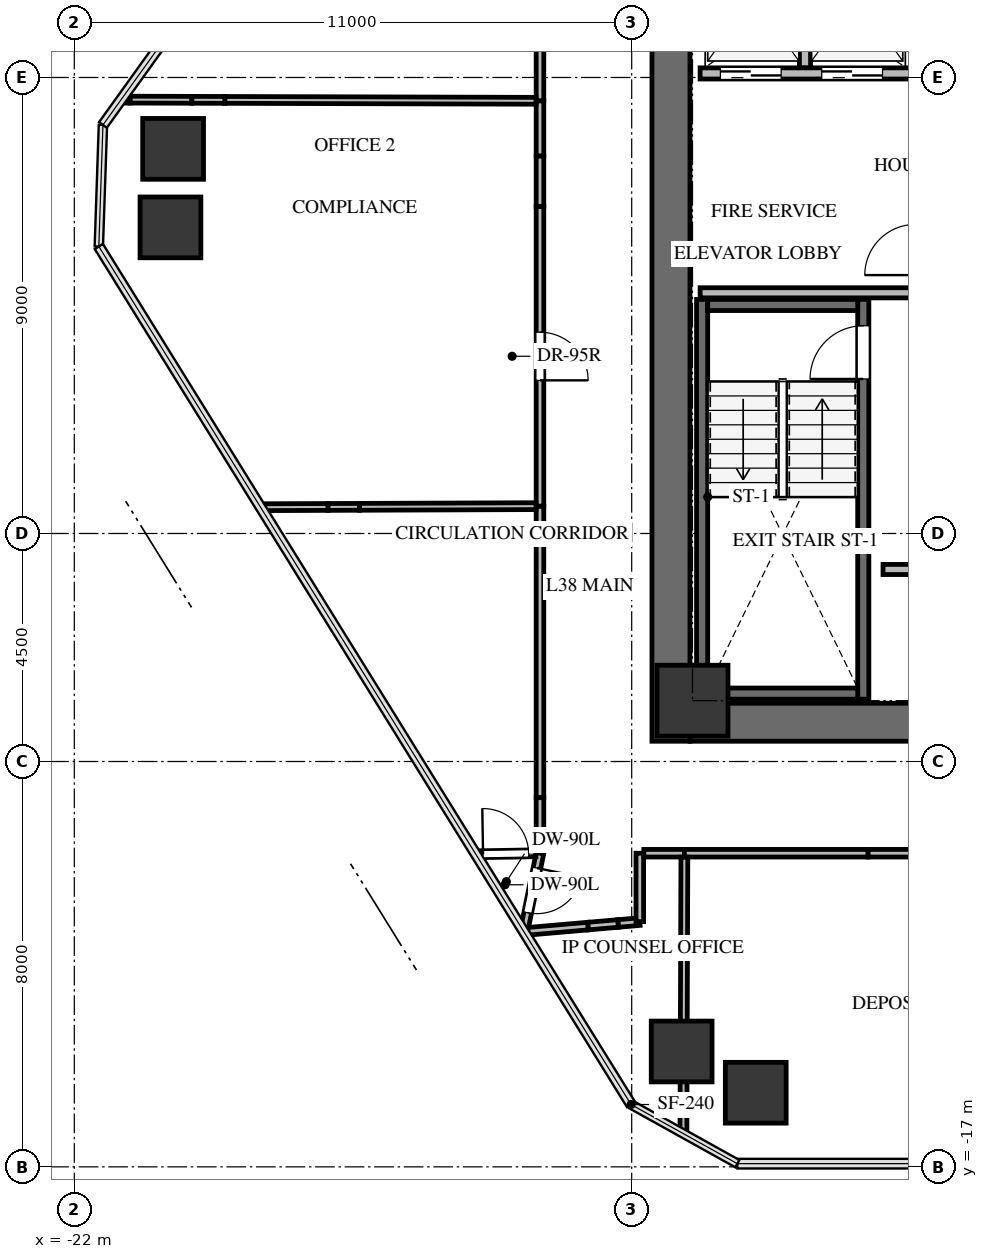
"""IFC4 building model, lengths in metres.
Left out: names, types, materials, properties, quantities, classifications, styles, units other than length and angle.
Written with IfcOpenShell. Run it as: python <this file> out.ifc"""

import sys

from ifc_helpers import new_model, si_unit, direction, frame, frame_2d, origin, origin_2d, place, context, subcontext, project, spatial, rectangle, extrude, source, transform, mapped, element, fill, save


model = new_model("IFC4")
c1 = context("Model", 3, precision=1e-05, world=origin(), true_north=direction((0.0, 1.0)))
c2 = subcontext(c1, "Body", "Model", "MODEL_VIEW")
j1 = project(units=[si_unit("LENGTHUNIT", "METRE"), si_unit("PLANEANGLEUNIT", "RADIAN")], contexts=[c1])
p1 = place(None, origin())
s1 = spatial("IfcSite", under=j1, at=p1, CompositionType="ELEMENT")
p2 = place(p1, origin())
s2 = spatial("IfcBuilding", under=s1, at=p2, CompositionType="ELEMENT")
p3 = place(p2, frame((0.0, 0.0, 140.1)))
s3 = spatial("IfcBuildingStorey", under=s2, at=p3, CompositionType="ELEMENT", Elevation=140.1)
p4 = place(p3, frame((-10.225, -8.6, 0.0), z_axis=(0.0, 0.0, 1.0), x_axis=(0.0, 1.0, 0.0)))
e1 = element("IfcWall", 1, at=p4, inside=s3, PredefinedType="SHEAR", context=c2, shape_type="SweptSolid", body=[
    extrude(rectangle(XDim=17.2, YDim=0.75, at=frame_2d((8.6, 0.0))), origin(), (0.0, 0.0, 1.0), 3.0),
])
p5 = place(p3, frame((-9.85, -8.225, 0.0), z_axis=(0.0, 0.0, 1.0), x_axis=(1.0, 0.0, 0.0)))
e2 = element("IfcWall", 2, at=p5, inside=s3, PredefinedType="SHEAR", context=c2, shape_type="SweptSolid", body=[
    extrude(rectangle(XDim=7.75, YDim=0.75, at=frame_2d((3.875, 0.0))), origin(), (0.0, 0.0, 1.0), 3.0),
])
p6 = place(p3, frame((-6.43, -7.77, -0.24), z_axis=(0.0, 0.0, 1.0), x_axis=(0.0, 1.0, 0.0)))
e3 = element("IfcWall", 3, at=p6, inside=s3, PredefinedType="SHEAR", context=c2, shape_type="SweptSolid", body=[
    extrude(rectangle(XDim=7.89, YDim=0.22, at=frame_2d((3.945, 0.0))), origin(), (0.0, 0.0, 1.0), 3.0),
])
p7 = place(p6, frame((6.32, 0.0, 0.0)))
e4 = element("IfcOpeningElement", 4, at=p7, cuts=e3, PredefinedType="OPENING", context=c2, shape_type="SweptSolid", body=[
    extrude(rectangle(XDim=1.05, YDim=2.15, at=frame_2d((0.525, 1.075))), frame((0.0, 0.12, 0.0), z_axis=(0.0, -1.0, 0.0), x_axis=(1.0, 0.0, 0.0)), (0.0, 0.0, 1.0), 0.24),
])
p8 = place(p3, frame((-9.61, 0.12, -0.24), z_axis=(0.0, 0.0, 1.0), x_axis=(0.0, -1.0, 0.0)))
e5 = element("IfcWall", 5, at=p8, inside=s3, PredefinedType="SHEAR", context=c2, shape_type="SweptSolid", body=[
    extrude(rectangle(XDim=7.89, YDim=0.22, at=frame_2d((3.945, 0.0))), origin(), (0.0, 0.0, 1.0), 3.0),
])
for number, where, z_axis, x_axis in (
    (6, (-9.5, -7.66, -0.24), (0.0, 0.0, 1.0), (1.0, 0.0, 0.0)),
    (7, (-6.54, 0.01, -0.24), (0.0, 0.0, 1.0), (-1.0, 0.0, 0.0)),
):
    element("IfcWall", number, at=place(p3, frame(where, z_axis=z_axis, x_axis=x_axis)), inside=s3, PredefinedType="SHEAR", context=c2, shape_type="SweptSolid", body=[
        extrude(rectangle(XDim=2.96, YDim=0.22, at=frame_2d((1.48, 0.0))), origin(), (0.0, 0.0, 1.0), 3.0),
    ])
m1 = source(origin(), c2, "Body", "SweptSolid", [
    extrude(rectangle(XDim=1.4, YDim=1.4, at=origin_2d()), origin(), (0.0, 0.0, 1.0), 3.0),
])
p9 = place(p3, frame((-9.8, -7.8, -0.24), z_axis=(0.0, 0.0, 1.0), x_axis=(1.0, 0.0, 0.0)))
e8 = element("IfcColumn", 8, at=p9, inside=s3, PredefinedType="COLUMN", context=c2, shape_type="MappedRepresentation", body=[
    mapped(m1, transform((0.0, 0.0, 0.0), x_axis=(1.0, 0.0, 0.0), y_axis=(0.0, 1.0, 0.0), z_axis=(0.0, 0.0, 1.0), scale=1.0)),
])
m2 = source(origin(), c2, "Body", "SweptSolid", [
    extrude(rectangle(XDim=1.2, YDim=1.2, at=origin_2d()), origin(), (0.0, 0.0, 1.0), 3.0),
])
for number, where, z_axis, x_axis in (
    (9, (-10.014, -14.723, -0.24), (0.0, 0.0, 1.0), (1.0, 0.0, 0.0)),
    (10, (-20.103, 1.542, -0.24), (0.0, 0.0, 1.0), (1.0, 0.0, 0.0)),
    (11, (-20.05, 3.091, -0.24), (0.0, 0.0, 1.0), (1.0, 0.0, 0.0)),
    (12, (-8.552, -15.537, -0.24), (0.0, 0.0, 1.0), (1.0, 0.0, 0.0)),
):
    element("IfcColumn", number, at=place(p3, frame(where, z_axis=z_axis, x_axis=x_axis)), inside=s3, PredefinedType="COLUMN", context=c2, shape_type="MappedRepresentation", body=[
        mapped(m2, transform((0.0, 0.0, 0.0), x_axis=(1.0, 0.0, 0.0), y_axis=(0.0, 1.0, 0.0), z_axis=(0.0, 0.0, 1.0), scale=1.0)),
    ])
p10 = place(p3, frame((-9.65, 4.58, 0.0), z_axis=(0.0, 0.0, 1.0), x_axis=(1.0, 0.0, 0.0)))
e13 = element("IfcWall", 13, at=p10, inside=s3, PredefinedType="SOLIDWALL", context=c2, shape_type="SweptSolid", body=[
    extrude(rectangle(XDim=4.175, YDim=0.22, at=frame_2d((2.087, 0.0))), origin(), (0.0, 0.0, 1.0), 2.745),
])
p11 = place(p10, frame((0.4, 0.0, 0.0)))
e14 = element("IfcOpeningElement", 14, at=p11, cuts=e13, PredefinedType="OPENING", context=c2, shape_type="SweptSolid", body=[
    extrude(rectangle(XDim=1.2, YDim=2.15, at=frame_2d((0.6, 1.075))), frame((0.0, 0.12, 0.0), z_axis=(0.0, -1.0, 0.0), x_axis=(1.0, 0.0, 0.0)), (0.0, 0.0, 1.0), 0.24),
])
p12 = place(p10, frame((2.4, 0.0, 0.0)))
e15 = element("IfcOpeningElement", 15, at=p12, cuts=e13, PredefinedType="OPENING", context=c2, shape_type="SweptSolid", body=[
    extrude(rectangle(XDim=1.2, YDim=2.15, at=frame_2d((0.6, 1.075))), frame((0.0, 0.12, 0.0), z_axis=(0.0, -1.0, 0.0), x_axis=(1.0, 0.0, 0.0)), (0.0, 0.0, 1.0), 0.24),
])
p13 = place(p3, frame((-7.58, 4.694, 0.0), z_axis=(0.0, 0.0, 1.0), x_axis=(0.0, 1.0, 0.0)))
e16 = element("IfcWall", 16, at=p13, inside=s3, PredefinedType="SOLIDWALL", context=c2, shape_type="SweptSolid", body=[
    extrude(rectangle(XDim=2.906, YDim=0.22, at=frame_2d((1.453, 0.0))), origin(), (0.0, 0.0, 1.0), 2.745),
])
p14 = place(p3, frame((-9.65, 0.25, 0.0), z_axis=(0.0, 0.0, 1.0), x_axis=(1.0, 0.0, 0.0)))
e17 = element("IfcWall", 17, at=p14, inside=s3, PredefinedType="SOLIDWALL", context=c2, shape_type="SweptSolid", body=[
    extrude(rectangle(XDim=4.27, YDim=0.2, at=frame_2d((2.135, 0.0))), origin(), (0.0, 0.0, 1.0), 2.745),
])
p15 = place(p3, frame((-6.04, -5.21, 0.0), z_axis=(0.0, 0.0, 1.0), x_axis=(1.0, 0.0, 0.0)))
e18 = element("IfcWall", 18, at=p15, inside=s3, PredefinedType="SOLIDWALL", context=c2, shape_type="SweptSolid", body=[
    extrude(rectangle(XDim=3.53, YDim=0.2, at=frame_2d((1.765, 0.0))), origin(), (0.0, 0.0, 1.0), 2.745),
])
p16 = place(p15, frame((1.315, 0.0, 0.0)))
e19 = element("IfcOpeningElement", 19, at=p16, cuts=e18, PredefinedType="OPENING", context=c2, shape_type="SweptSolid", body=[
    extrude(rectangle(XDim=0.9, YDim=2.05, at=frame_2d((0.45, 1.025))), frame((0.0, 0.11, 0.0), z_axis=(0.0, -1.0, 0.0), x_axis=(1.0, 0.0, 0.0)), (0.0, 0.0, 1.0), 0.22),
])
p17 = place(p3, frame((-13.129, -12.358, 0.0), z_axis=(0.0, 0.0, 1.0), x_axis=(0.996285787619, 0.086108242279, 0.0)))
e20 = element("IfcWall", 20, at=p17, inside=s3, PredefinedType="PARTITIONING", context=c2, shape_type="SweptSolid", body=[
    extrude(rectangle(XDim=1.273, YDim=0.15, at=frame_2d((0.636, 0.0))), origin(), (0.0, 0.0, 1.0), 2.745),
])
p18 = place(p3, frame((-11.27, -12.197, 0.0), z_axis=(0.0, 0.0, 1.0), x_axis=(0.996291394281, 0.086043347688, 0.0)))
e21 = element("IfcWall", 21, at=p18, inside=s3, PredefinedType="PARTITIONING", context=c2, shape_type="SweptSolid", body=[
    extrude(rectangle(XDim=0.431, YDim=0.15, at=frame_2d((0.216, 0.0))), origin(), (0.0, 0.0, 1.0), 2.745),
])
p19 = place(p3, frame((-11.861, -12.248, 0.0), z_axis=(0.0, 0.0, 1.0), x_axis=(0.996256019863, 0.086451968666, 0.0)))
e22 = element("IfcWall", 22, at=p19, inside=s3, PredefinedType="PARTITIONING", context=c2, shape_type="SweptSolid", body=[
    extrude(rectangle(XDim=0.593, YDim=0.15, at=frame_2d((0.296, 0.0))), origin(), (0.0, 0.0, 1.0), 2.08),
])
p20 = place(p3, frame((-12.81, -10.81, 0.0), z_axis=(0.0, 0.0, 1.0), x_axis=(-0.201786289638, -0.979429575474, 0.0)))
e23 = element("IfcWall", 23, at=p20, inside=s3, PredefinedType="PARTITIONING", context=c2, shape_type="SweptSolid", body=[
    extrude(rectangle(XDim=1.498, YDim=0.15, at=frame_2d((0.749, 0.0))), origin(), (0.0, 0.0, 1.0), 2.745),
])
p21 = place(p20, frame((0.299, 0.0, 0.0)))
e24 = element("IfcOpeningElement", 24, at=p21, cuts=e23, PredefinedType="OPENING", context=c2, shape_type="SweptSolid", body=[
    extrude(rectangle(XDim=0.9, YDim=2.05, at=frame_2d((0.45, 1.025))), frame((0.0, 0.085, 0.0), z_axis=(0.0, -1.0, 0.0), x_axis=(1.0, 0.0, 0.0)), (0.0, 0.0, 1.0), 0.17),
])
p22 = place(p3, frame((-10.84, -12.16, 0.0), z_axis=(0.0, 0.0, 1.0), x_axis=(0.0, 1.0, 0.0)))
e25 = element("IfcWall", 25, at=p22, inside=s3, PredefinedType="PARTITIONING", context=c2, shape_type="SweptSolid", body=[
    extrude(rectangle(XDim=1.35, YDim=0.15, at=frame_2d((0.675, 0.0))), origin(), (0.0, 0.0, 1.0), 2.745),
])
p23 = place(p3, frame((-10.761, -10.81, 0.0), z_axis=(0.0, 0.0, 1.0), x_axis=(1.0, 0.0, 0.0)))
e26 = element("IfcWall", 26, at=p23, inside=s3, PredefinedType="PARTITIONING", context=c2, shape_type="SweptSolid", body=[
    extrude(rectangle(XDim=0.801, YDim=0.15, at=frame_2d((0.4, 0.0))), origin(), (0.0, 0.0, 1.0), 2.745),
])
p24 = place(p3, frame((-9.96, -10.81, 0.0), z_axis=(0.0, 0.0, 1.0), x_axis=(1.0, 0.0, 0.0)))
e27 = element("IfcWall", 27, at=p24, inside=s3, PredefinedType="PARTITIONING", context=c2, shape_type="SweptSolid", body=[
    extrude(rectangle(XDim=3.625, YDim=0.15, at=frame_2d((1.813, 0.0))), origin(), (0.0, 0.0, 1.0), 1.912),
])
p25 = place(p3, frame((-6.334, -10.81, 0.0), z_axis=(0.0, 0.0, 1.0), x_axis=(1.0, 0.0, 0.0)))
e28 = element("IfcWall", 28, at=p25, inside=s3, PredefinedType="PARTITIONING", context=c2, shape_type="SweptSolid", body=[
    extrude(rectangle(XDim=0.848, YDim=0.15, at=frame_2d((0.424, 0.0))), origin(), (0.0, 0.0, 1.0), 1.912),
])
p26 = place(p3, frame((-12.81, -3.96, 0.0), z_axis=(0.0, 0.0, 1.0), x_axis=(0.0, -1.0, 0.0)))
e29 = element("IfcWall", 29, at=p26, inside=s3, PredefinedType="PARTITIONING", context=c2, shape_type="SweptSolid", body=[
    extrude(rectangle(XDim=5.754, YDim=0.15, at=frame_2d((2.877, 0.0))), origin(), (0.0, 0.0, 1.0), 2.08),
])
p27 = place(p3, frame((-12.81, -9.714, 0.0), z_axis=(0.0, 0.0, 1.0), x_axis=(0.0, -1.0, 0.0)))
e30 = element("IfcWall", 30, at=p27, inside=s3, PredefinedType="PARTITIONING", context=c2, shape_type="SweptSolid", body=[
    extrude(rectangle(XDim=1.004, YDim=0.15, at=frame_2d((0.502, 0.0))), origin(), (0.0, 0.0, 1.0), 2.08),
])
p28 = place(p3, frame((-12.81, 4.04, 0.0), z_axis=(0.0, 0.0, 1.0), x_axis=(0.0, -1.0, 0.0)))
e31 = element("IfcWall", 31, at=p28, inside=s3, PredefinedType="PARTITIONING", context=c2, shape_type="SweptSolid", body=[
    extrude(rectangle(XDim=1.092, YDim=0.15, at=frame_2d((0.546, 0.0))), origin(), (0.0, 0.0, 1.0), 2.745),
])
p29 = place(p3, frame((-12.81, 1.955, 0.0), z_axis=(0.0, 0.0, 1.0), x_axis=(0.0, -1.0, 0.0)))
e32 = element("IfcWall", 32, at=p29, inside=s3, PredefinedType="PARTITIONING", context=c2, shape_type="SweptSolid", body=[
    extrude(rectangle(XDim=5.915, YDim=0.15, at=frame_2d((2.958, 0.0))), origin(), (0.0, 0.0, 1.0), 2.745),
])
p30 = place(p29, frame((2.483, 0.0, 0.0)))
e33 = element("IfcOpeningElement", 33, at=p30, cuts=e32, PredefinedType="OPENING", context=c2, shape_type="SweptSolid", body=[
    extrude(rectangle(XDim=0.95, YDim=2.1, at=frame_2d((0.475, 1.05))), frame((0.0, 0.085, 0.0), z_axis=(0.0, -1.0, 0.0), x_axis=(1.0, 0.0, 0.0)), (0.0, 0.0, 1.0), 0.17),
])
p31 = place(p3, frame((-12.81, 2.948, 0.0), z_axis=(0.0, 0.0, 1.0), x_axis=(0.0, -1.0, 0.0)))
e34 = element("IfcWall", 34, at=p31, inside=s3, PredefinedType="PARTITIONING", context=c2, shape_type="SweptSolid", body=[
    extrude(rectangle(XDim=0.993, YDim=0.15, at=frame_2d((0.497, 0.0))), origin(), (0.0, 0.0, 1.0), 1.912),
])
p32 = place(p3, frame((-12.81, 10.81, 0.0), z_axis=(0.0, 0.0, 1.0), x_axis=(0.0, -1.0, 0.0)))
e35 = element("IfcWall", 35, at=p32, inside=s3, PredefinedType="PARTITIONING", context=c2, shape_type="SweptSolid", body=[
    extrude(rectangle(XDim=6.77, YDim=0.15, at=frame_2d((3.385, 0.0))), origin(), (0.0, 0.0, 1.0), 2.745),
])
p33 = place(p32, frame((2.925, 0.0, 0.0)))
e36 = element("IfcOpeningElement", 36, at=p33, cuts=e35, PredefinedType="OPENING", context=c2, shape_type="SweptSolid", body=[
    extrude(rectangle(XDim=0.92, YDim=2.1, at=frame_2d((0.46, 1.05))), frame((0.0, 0.085, 0.0), z_axis=(0.0, -1.0, 0.0), x_axis=(1.0, 0.0, 0.0)), (0.0, 0.0, 1.0), 0.17),
])
p34 = place(p3, frame((-9.96, -10.889, 0.0), z_axis=(0.0, 0.0, 1.0), x_axis=(-0.003528457908, -0.999993774973, 0.0)))
e37 = element("IfcWall", 37, at=p34, inside=s3, PredefinedType="PARTITIONING", context=c2, shape_type="SweptSolid", body=[
    extrude(rectangle(XDim=3.39, YDim=0.135, at=frame_2d((1.695, 0.0))), origin(), (0.0, 0.0, 1.0), 1.912),
])
p35 = place(p3, frame((-9.975, -15.048, 0.0), z_axis=(0.0, 0.0, 1.0), x_axis=(-0.003576784349, -0.999993603286, 0.0)))
e38 = element("IfcWall", 38, at=p35, inside=s3, PredefinedType="PARTITIONING", context=c2, shape_type="SweptSolid", body=[
    extrude(rectangle(XDim=1.297, YDim=0.135, at=frame_2d((0.648, 0.0))), origin(), (0.0, 0.0, 1.0), 2.745),
])
p36 = place(p3, frame((-9.972, -14.279, 0.0), z_axis=(0.0, 0.0, 1.0), x_axis=(-0.003494260751, -0.999993895052, 0.0)))
e39 = element("IfcWall", 39, at=p36, inside=s3, PredefinedType="PARTITIONING", context=c2, shape_type="SweptSolid", body=[
    extrude(rectangle(XDim=0.769, YDim=0.135, at=frame_2d((0.384, 0.0))), origin(), (0.0, 0.0, 1.0), 1.577),
])
p37 = place(p3, frame((-14.076, -10.831, 0.0), z_axis=(0.0, 0.0, 1.0), x_axis=(0.999860796611, 0.016684945308, 0.0)))
e40 = element("IfcWall", 40, at=p37, inside=s3, PredefinedType="PARTITIONING", context=c2, shape_type="SweptSolid", body=[
    extrude(rectangle(XDim=1.185, YDim=0.135, at=frame_2d((0.593, 0.0))), origin(), (0.0, 0.0, 1.0), 2.745),
])
p38 = place(p37, frame((0.143, 0.0, 0.0)))
e41 = element("IfcOpeningElement", 41, at=p38, cuts=e40, PredefinedType="OPENING", context=c2, shape_type="SweptSolid", body=[
    extrude(rectangle(XDim=0.9, YDim=2.05, at=frame_2d((0.45, 1.025))), frame((0.0, 0.078, 0.0), z_axis=(0.0, -1.0, 0.0), x_axis=(1.0, 0.0, 0.0)), (0.0, 0.0, 1.0), 0.155),
])
p39 = place(p3, frame((-18.325, -3.981, 0.0), z_axis=(0.0, 0.0, 1.0), x_axis=(0.999992603632, 0.003846125399, 0.0)))
e42 = element("IfcWall", 42, at=p39, inside=s3, PredefinedType="PARTITIONING", context=c2, shape_type="SweptSolid", body=[
    extrude(rectangle(XDim=1.333, YDim=0.135, at=frame_2d((0.667, 0.0))), origin(), (0.0, 0.0, 1.0), 2.745),
])
p40 = place(p3, frame((-16.371, -3.974, 0.0), z_axis=(0.0, 0.0, 1.0), x_axis=(0.999992563123, 0.003856643361, 0.0)))
e43 = element("IfcWall", 43, at=p40, inside=s3, PredefinedType="PARTITIONING", context=c2, shape_type="SweptSolid", body=[
    extrude(rectangle(XDim=3.482, YDim=0.135, at=frame_2d((1.741, 0.0))), origin(), (0.0, 0.0, 1.0), 2.745),
])
p41 = place(p3, frame((-16.992, -3.976, 0.0), z_axis=(0.0, 0.0, 1.0), x_axis=(0.999992274426, 0.003930787242, 0.0)))
e44 = element("IfcWall", 44, at=p41, inside=s3, PredefinedType="PARTITIONING", context=c2, shape_type="SweptSolid", body=[
    extrude(rectangle(XDim=0.621, YDim=0.135, at=frame_2d((0.311, 0.0))), origin(), (0.0, 0.0, 1.0), 2.08),
])
p42 = place(p3, frame((-20.901, 4.063, 0.0), z_axis=(0.0, 0.0, 1.0), x_axis=(0.999996083157, -0.002798869485, 0.0)))
e45 = element("IfcWall", 45, at=p42, inside=s3, PredefinedType="PARTITIONING", context=c2, shape_type="SweptSolid", body=[
    extrude(rectangle(XDim=1.221, YDim=0.135, at=frame_2d((0.611, 0.0))), origin(), (0.0, 0.0, 1.0), 1.577),
])
p43 = place(p3, frame((-19.03, 4.058, 0.0), z_axis=(0.0, 0.0, 1.0), x_axis=(0.999996016453, -0.002822601462, 0.0)))
e46 = element("IfcWall", 46, at=p43, inside=s3, PredefinedType="PARTITIONING", context=c2, shape_type="SweptSolid", body=[
    extrude(rectangle(XDim=6.141, YDim=0.135, at=frame_2d((3.071, 0.0))), origin(), (0.0, 0.0, 1.0), 2.745),
])
p44 = place(p3, frame((-21.075, 4.063, 0.0), z_axis=(0.0, 0.0, 1.0), x_axis=(0.999996065873, -0.002805038053, 0.0)))
e47 = element("IfcWall", 47, at=p44, inside=s3, PredefinedType="PARTITIONING", context=c2, shape_type="SweptSolid", body=[
    extrude(rectangle(XDim=0.174, YDim=0.135, at=frame_2d((0.087, 0.0))), origin(), (0.0, 0.0, 1.0), 1.577),
])
p45 = place(p3, frame((-19.68, 4.059, 0.0), z_axis=(0.0, 0.0, 1.0), x_axis=(0.999996545211, -0.002628605263, 0.0)))
e48 = element("IfcWall", 48, at=p45, inside=s3, PredefinedType="PARTITIONING", context=c2, shape_type="SweptSolid", body=[
    extrude(rectangle(XDim=0.65, YDim=0.135, at=frame_2d((0.325, 0.0))), origin(), (0.0, 0.0, 1.0), 2.08),
])
m3 = source(origin(), c2, "Body", "SweptSolid", [
    extrude(rectangle(XDim=1.05, YDim=2.15, at=frame_2d((0.525, 1.075))), frame((0.0, 0.025, 0.0), z_axis=(0.0, -1.0, 0.0), x_axis=(1.0, 0.0, 0.0)), (0.0, 0.0, 1.0), 0.05),
])
p46 = place(p7, origin())
e49 = element("IfcDoor", 49, at=p46, inside=s3, OperationType="SINGLE_SWING_LEFT", PredefinedType="DOOR", context=c2, shape_type="MappedRepresentation", body=[
    mapped(m3, transform((0.0, 0.0, 0.0), x_axis=(1.0, 0.0, 0.0), y_axis=(0.0, 1.0, 0.0), z_axis=(0.0, 0.0, 1.0), scale=1.0)),
])
fill(e4, e49)
m4 = source(origin(), c2, "Body", "SweptSolid", [
    extrude(rectangle(XDim=1.2, YDim=2.15, at=frame_2d((0.6, 1.075))), frame((0.0, 0.025, 0.0), z_axis=(0.0, -1.0, 0.0), x_axis=(1.0, 0.0, 0.0)), (0.0, 0.0, 1.0), 0.05),
])
p47 = place(p11, origin())
e50 = element("IfcDoor", 50, at=p47, inside=s3, OperationType="DOUBLE_DOOR_SLIDING", PredefinedType="DOOR", context=c2, shape_type="MappedRepresentation", body=[
    mapped(m4, transform((0.0, 0.0, 0.0), x_axis=(1.0, 0.0, 0.0), y_axis=(0.0, 1.0, 0.0), z_axis=(0.0, 0.0, 1.0), scale=1.0)),
])
fill(e14, e50)
p48 = place(p12, origin())
e51 = element("IfcDoor", 51, at=p48, inside=s3, OperationType="DOUBLE_DOOR_SLIDING", PredefinedType="DOOR", context=c2, shape_type="MappedRepresentation", body=[
    mapped(m4, transform((0.0, 0.0, 0.0), x_axis=(1.0, 0.0, 0.0), y_axis=(0.0, 1.0, 0.0), z_axis=(0.0, 0.0, 1.0), scale=1.0)),
])
fill(e15, e51)
m5 = source(origin(), c2, "Body", "SweptSolid", [
    extrude(rectangle(XDim=0.9, YDim=2.05, at=frame_2d((0.45, 1.025))), frame((0.0, 0.025, 0.0), z_axis=(0.0, -1.0, 0.0), x_axis=(1.0, 0.0, 0.0)), (0.0, 0.0, 1.0), 0.05),
])
p49 = place(p21, origin())
e52 = element("IfcDoor", 52, at=p49, inside=s3, OperationType="SINGLE_SWING_LEFT", PredefinedType="DOOR", context=c2, shape_type="MappedRepresentation", body=[
    mapped(m5, transform((0.0, 0.0, 0.0), x_axis=(1.0, 0.0, 0.0), y_axis=(0.0, 1.0, 0.0), z_axis=(0.0, 0.0, 1.0), scale=1.0)),
])
fill(e24, e52)
m6 = source(origin(), c2, "Body", "SweptSolid", [
    extrude(rectangle(XDim=0.95, YDim=2.1, at=frame_2d((0.475, 1.05))), frame((0.0, 0.025, 0.0), z_axis=(0.0, -1.0, 0.0), x_axis=(1.0, 0.0, 0.0)), (0.0, 0.0, 1.0), 0.05),
])
p50 = place(p30, origin())
e53 = element("IfcDoor", 53, at=p50, inside=s3, OperationType="SINGLE_SWING_RIGHT", PredefinedType="DOOR", context=c2, shape_type="MappedRepresentation", body=[
    mapped(m6, transform((0.0, 0.0, 0.0), x_axis=(1.0, 0.0, 0.0), y_axis=(0.0, 1.0, 0.0), z_axis=(0.0, 0.0, 1.0), scale=1.0)),
])
fill(e33, e53)
p51 = place(p38, origin())
e54 = element("IfcDoor", 54, at=p51, inside=s3, OperationType="SINGLE_SWING_LEFT", PredefinedType="DOOR", context=c2, shape_type="MappedRepresentation", body=[
    mapped(m5, transform((0.0, 0.0, 0.0), x_axis=(1.0, 0.0, 0.0), y_axis=(0.0, 1.0, 0.0), z_axis=(0.0, 0.0, 1.0), scale=1.0)),
])
fill(e41, e54)
save(model, sys.argv[1])
